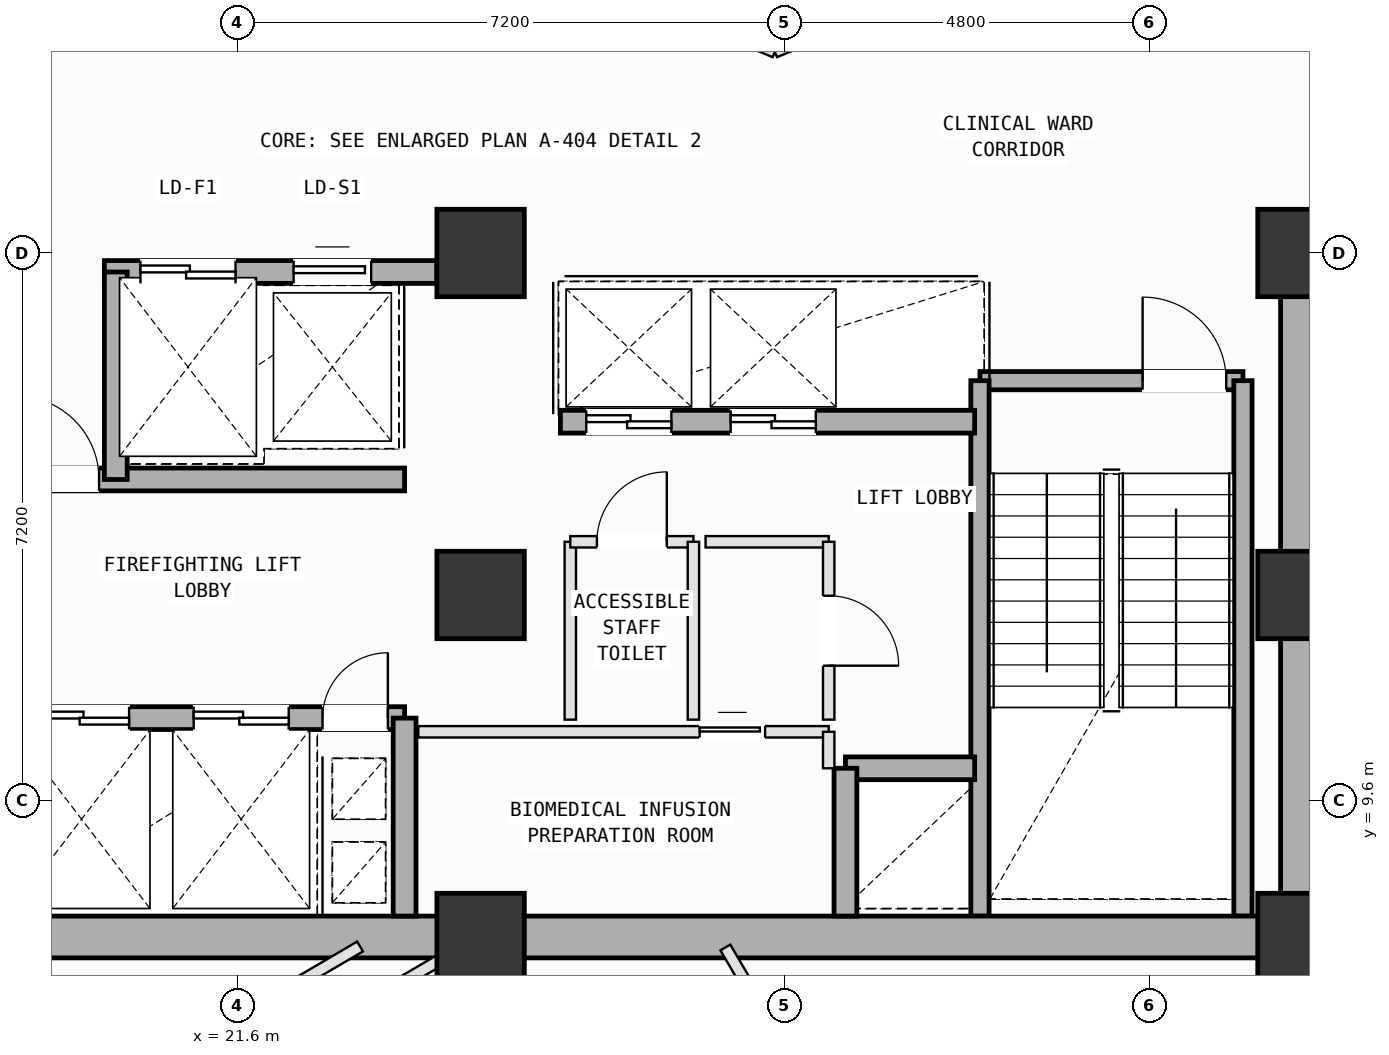
"""IFC4 building model, lengths in metres.
Left out: names, types, materials, properties, quantities, classifications, styles, units other than length and angle.
Written with IfcOpenShell. Run it as: python <this file> out.ifc"""

import sys

from ifc_helpers import new_model, si_unit, direction, frame, frame_2d, origin, origin_2d, place, context, subcontext, project, spatial, rectangle, extrude, element, fill, save


model = new_model("IFC4")
c1 = context("Model", 3, precision=1e-05, world=origin(), true_north=direction((0.0, 1.0)))
c2 = subcontext(c1, "Body", "Model", "MODEL_VIEW")
j1 = project(units=[si_unit("LENGTHUNIT", "METRE"), si_unit("PLANEANGLEUNIT", "RADIAN")], contexts=[c1])
p1 = place(None, origin())
s1 = spatial("IfcSite", under=j1, at=p1, CompositionType="ELEMENT")
p2 = place(p1, origin())
s2 = spatial("IfcBuilding", under=s1, at=p2, CompositionType="ELEMENT")
p3 = place(p2, frame((0.0, 0.0, 153.8)))
s3 = spatial("IfcBuildingStorey", under=s2, at=p3, CompositionType="ELEMENT", Elevation=153.8)
for number, where, z_axis, x_axis in (
    (1, (24.8, 7.8, 0.0), (0.0, 0.0, 1.0), (1.0, 0.0, 0.0)),
    (2, (24.8, 12.3, 0.0), (0.0, 0.0, 1.0), (1.0, 0.0, 0.0)),
    (3, (24.8, 16.8, 0.0), (0.0, 0.0, 1.0), (1.0, 0.0, 0.0)),
    (4, (35.6, 7.8, 0.0), (0.0, 0.0, 1.0), (1.0, 0.0, 0.0)),
    (5, (35.6, 12.3, 0.0), (0.0, 0.0, 1.0), (1.0, 0.0, 0.0)),
    (6, (35.6, 16.8, 0.0), (0.0, 0.0, 1.0), (1.0, 0.0, 0.0)),
):
    element("IfcColumn", number, at=place(p3, frame(where, z_axis=z_axis, x_axis=x_axis)), inside=s3, PredefinedType="COLUMN", context=c2, shape_type="SweptSolid", body=[
        extrude(rectangle(XDim=1.15, YDim=1.15, at=origin_2d()), origin(), (0.0, 0.0, 1.0), 4.0),
    ])
p4 = place(p3, frame((28.634, 20.321, 0.002), z_axis=(0.018686718776, -0.020396614612, 0.999617319105), x_axis=(-0.467601093999, 0.883534166025, 0.026769280116)))
e7 = element("IfcColumn", 7, at=p4, inside=s3, PredefinedType="COLUMN", context=c2, shape_type="SweptSolid", body=[
    extrude(rectangle(XDim=1.4, YDim=0.8, at=origin_2d()), origin(), (0.0, 0.0, 1.0), 3.998),
])
p5 = place(p3, frame((31.37, 15.12, 0.0), z_axis=(0.0, 0.0, 1.0), x_axis=(1.0, 0.0, 0.0)))
e8 = element("IfcWall", 8, at=p5, inside=s3, PredefinedType="SOLIDWALL", context=c2, shape_type="SweptSolid", body=[
    extrude(rectangle(XDim=3.46, YDim=0.24, at=frame_2d((1.73, 0.0))), origin(), (0.0, 0.0, 1.0), 3.78),
])
p6 = place(p5, frame((2.14, 0.0, 0.0)))
e9 = element("IfcOpeningElement", 9, at=p6, cuts=e8, PredefinedType="OPENING", context=c2, shape_type="SweptSolid", body=[
    extrude(rectangle(XDim=1.1, YDim=2.15, at=frame_2d((0.55, 1.075))), frame((0.0, 0.13, 0.0), z_axis=(0.0, -1.0, 0.0), x_axis=(1.0, 0.0, 0.0)), (0.0, 0.0, 1.0), 0.26),
])
for number, where, z_axis, x_axis in (
    (10, (34.83, 15.12, 0.0), (0.0, 0.0, 1.0), (0.0, -1.0, 0.0)),
    (11, (31.37, 8.075, 0.0), (0.0, 0.0, 1.0), (0.0, 1.0, 0.0)),
):
    element("IfcWall", number, at=place(p3, frame(where, z_axis=z_axis, x_axis=x_axis)), inside=s3, PredefinedType="SOLIDWALL", context=c2, shape_type="SweptSolid", body=[
        extrude(rectangle(XDim=7.045, YDim=0.24, at=frame_2d((3.522, 0.0))), origin(), (0.0, 0.0, 1.0), 3.78),
    ])
for number, where, z_axis, x_axis in (
    (12, (14.0, 7.8, 0.0), (0.0, 0.0, 1.0), (1.0, 0.0, 0.0)),
    (13, (24.8, 7.8, 0.0), (0.0, 0.0, 1.0), (1.0, 0.0, 0.0)),
):
    element("IfcWall", number, at=place(p3, frame(where, z_axis=z_axis, x_axis=x_axis)), inside=s3, PredefinedType="SHEAR", context=c2, shape_type="SweptSolid", body=[
        extrude(rectangle(XDim=10.8, YDim=0.55, at=frame_2d((5.4, 0.0))), origin(), (0.0, 0.0, 1.0), 3.78),
    ])
p7 = place(p3, frame((35.6, 7.8, 0.0), z_axis=(0.0, 0.0, 1.0), x_axis=(0.0, 1.0, 0.0)))
e14 = element("IfcWall", 14, at=p7, inside=s3, PredefinedType="SHEAR", context=c2, shape_type="SweptSolid", body=[
    extrude(rectangle(XDim=9.0, YDim=0.55, at=frame_2d((4.5, 0.0))), origin(), (0.0, 0.0, 1.0), 3.78),
])
p8 = place(p3, frame((19.85, 16.55, 0.0), z_axis=(0.0, 0.0, 1.0), x_axis=(1.0, 0.0, 0.0)))
e15 = element("IfcWall", 15, at=p8, inside=s3, PredefinedType="SOLIDWALL", context=c2, shape_type="SweptSolid", body=[
    extrude(rectangle(XDim=4.375, YDim=0.3, at=frame_2d((2.188, 0.0))), origin(), (0.0, 0.0, 1.0), 3.78),
])
p9 = place(p8, frame((0.475, 0.0, 0.0)))
e16 = element("IfcOpeningElement", 16, at=p9, cuts=e15, PredefinedType="OPENING", context=c2, shape_type="SweptSolid", body=[
    extrude(rectangle(XDim=1.25, YDim=2.18, at=frame_2d((0.625, 1.09))), frame((0.0, 0.16, 0.0), z_axis=(0.0, -1.0, 0.0), x_axis=(1.0, 0.0, 0.0)), (0.0, 0.0, 1.0), 0.32),
])
p10 = place(p8, frame((2.49, 0.0, 0.0)))
e17 = element("IfcOpeningElement", 17, at=p10, cuts=e15, PredefinedType="OPENING", context=c2, shape_type="SweptSolid", body=[
    extrude(rectangle(XDim=1.02, YDim=2.12, at=frame_2d((0.51, 1.06))), frame((0.0, 0.16, 0.0), z_axis=(0.0, -1.0, 0.0), x_axis=(1.0, 0.0, 0.0)), (0.0, 0.0, 1.0), 0.32),
])
p11 = place(p3, frame((18.5, 10.68, 0.0), z_axis=(0.0, 0.0, 1.0), x_axis=(1.0, 0.0, 0.0)))
e18 = element("IfcWall", 18, at=p11, inside=s3, PredefinedType="SOLIDWALL", context=c2, shape_type="SweptSolid", body=[
    extrude(rectangle(XDim=5.3, YDim=0.3, at=frame_2d((2.65, 0.0))), origin(), (0.0, 0.0, 1.0), 3.78),
])
p12 = place(p11, frame((4.22, 0.0, 0.0)))
e19 = element("IfcOpeningElement", 19, at=p12, cuts=e18, PredefinedType="OPENING", context=c2, shape_type="SweptSolid", body=[
    extrude(rectangle(XDim=0.86, YDim=2.06, at=frame_2d((0.43, 1.03))), frame((0.0, 0.16, 0.0), z_axis=(0.0, -1.0, 0.0), x_axis=(1.0, 0.0, 0.0)), (0.0, 0.0, 1.0), 0.32),
])
p13 = place(p11, frame((0.425, 0.0, 0.0)))
e20 = element("IfcOpeningElement", 20, at=p13, cuts=e18, PredefinedType="OPENING", context=c2, shape_type="SweptSolid", body=[
    extrude(rectangle(XDim=1.25, YDim=2.18, at=frame_2d((0.625, 1.09))), frame((0.0, 0.16, 0.0), z_axis=(0.0, -1.0, 0.0), x_axis=(1.0, 0.0, 0.0)), (0.0, 0.0, 1.0), 0.32),
])
p14 = place(p11, frame((2.525, 0.0, 0.0)))
e21 = element("IfcOpeningElement", 21, at=p14, cuts=e18, PredefinedType="OPENING", context=c2, shape_type="SweptSolid", body=[
    extrude(rectangle(XDim=1.25, YDim=2.18, at=frame_2d((0.625, 1.09))), frame((0.0, 0.16, 0.0), z_axis=(0.0, -1.0, 0.0), x_axis=(1.0, 0.0, 0.0)), (0.0, 0.0, 1.0), 0.32),
])
p15 = place(p3, frame((18.5, 13.82, 0.0), z_axis=(0.0, 0.0, 1.0), x_axis=(1.0, 0.0, 0.0)))
e22 = element("IfcWall", 22, at=p15, inside=s3, PredefinedType="SOLIDWALL", context=c2, shape_type="SweptSolid", body=[
    extrude(rectangle(XDim=5.3, YDim=0.3, at=frame_2d((2.65, 0.0))), origin(), (0.0, 0.0, 1.0), 3.78),
])
p16 = place(p15, frame((0.18, 0.0, 0.0)))
e23 = element("IfcOpeningElement", 23, at=p16, cuts=e22, PredefinedType="OPENING", context=c2, shape_type="SweptSolid", body=[
    extrude(rectangle(XDim=1.1, YDim=2.15, at=frame_2d((0.55, 1.075))), frame((0.0, 0.16, 0.0), z_axis=(0.0, -1.0, 0.0), x_axis=(1.0, 0.0, 0.0)), (0.0, 0.0, 1.0), 0.32),
])
p17 = place(p3, frame((23.8, 8.075, 0.0), z_axis=(0.0, 0.0, 1.0), x_axis=(0.0, 1.0, 0.0)))
e24 = element("IfcWall", 24, at=p17, inside=s3, PredefinedType="SOLIDWALL", context=c2, shape_type="SweptSolid", body=[
    extrude(rectangle(XDim=2.605, YDim=0.3, at=frame_2d((1.302, 0.0))), origin(), (0.0, 0.0, 1.0), 3.78),
])
p18 = place(p3, frame((20.0, 13.82, 0.0), z_axis=(0.0, 0.0, 1.0), x_axis=(0.0, 1.0, 0.0)))
e25 = element("IfcWall", 25, at=p18, inside=s3, PredefinedType="SOLIDWALL", context=c2, shape_type="SweptSolid", body=[
    extrude(rectangle(XDim=2.73, YDim=0.3, at=frame_2d((1.365, 0.0))), origin(), (0.0, 0.0, 1.0), 3.78),
])
p19 = place(p3, frame((29.6, 10.02, 0.0), z_axis=(0.0, 0.0, 1.0), x_axis=(1.0, 0.0, 0.0)))
e26 = element("IfcWall", 26, at=p19, inside=s3, PredefinedType="SOLIDWALL", context=c2, shape_type="SweptSolid", body=[
    extrude(rectangle(XDim=1.7, YDim=0.3, at=frame_2d((0.85, 0.0))), origin(), (0.0, 0.0, 1.0), 3.78),
])
p20 = place(p3, frame((29.6, 8.075, 0.0), z_axis=(0.0, 0.0, 1.0), x_axis=(0.0, 1.0, 0.0)))
e27 = element("IfcWall", 27, at=p20, inside=s3, PredefinedType="SOLIDWALL", context=c2, shape_type="SweptSolid", body=[
    extrude(rectangle(XDim=1.945, YDim=0.3, at=frame_2d((0.973, 0.0))), origin(), (0.0, 0.0, 1.0), 3.78),
])
p21 = place(p3, frame((25.85, 14.58, 0.0), z_axis=(0.0, 0.0, 1.0), x_axis=(1.0, 0.0, 0.0)))
e28 = element("IfcWall", 28, at=p21, inside=s3, PredefinedType="SOLIDWALL", context=c2, shape_type="SweptSolid", body=[
    extrude(rectangle(XDim=5.45, YDim=0.3, at=frame_2d((2.725, 0.0))), origin(), (0.0, 0.0, 1.0), 3.78),
])
p22 = place(p21, frame((0.34, 0.0, 0.0)))
e29 = element("IfcOpeningElement", 29, at=p22, cuts=e28, PredefinedType="OPENING", context=c2, shape_type="SweptSolid", body=[
    extrude(rectangle(XDim=1.12, YDim=2.15, at=frame_2d((0.56, 1.075))), frame((0.0, 0.16, 0.0), z_axis=(0.0, -1.0, 0.0), x_axis=(1.0, 0.0, 0.0)), (0.0, 0.0, 1.0), 0.32),
])
p23 = place(p21, frame((2.24, 0.0, 0.0)))
e30 = element("IfcOpeningElement", 30, at=p23, cuts=e28, PredefinedType="OPENING", context=c2, shape_type="SweptSolid", body=[
    extrude(rectangle(XDim=1.12, YDim=2.15, at=frame_2d((0.56, 1.075))), frame((0.0, 0.16, 0.0), z_axis=(0.0, -1.0, 0.0), x_axis=(1.0, 0.0, 0.0)), (0.0, 0.0, 1.0), 0.32),
])
p24 = place(p3, frame((23.98, 10.5, 0.0), z_axis=(0.0, 0.0, 1.0), x_axis=(1.0, 0.0, 0.0)))
e31 = element("IfcWall", 31, at=p24, inside=s3, PredefinedType="PARTITIONING", context=c2, shape_type="SweptSolid", body=[
    extrude(rectangle(XDim=5.4, YDim=0.15, at=frame_2d((2.7, 0.0))), origin(), (0.0, 0.0, 1.0), 3.78),
])
p25 = place(p24, frame((3.703, 0.0, 0.0)))
e32 = element("IfcOpeningElement", 32, at=p25, cuts=e31, PredefinedType="OPENING", context=c2, shape_type="SweptSolid", body=[
    extrude(rectangle(XDim=0.86, YDim=2.06, at=frame_2d((0.43, 1.03))), frame((0.0, 0.085, 0.0), z_axis=(0.0, -1.0, 0.0), x_axis=(1.0, 0.0, 0.0)), (0.0, 0.0, 1.0), 0.17),
])
p26 = place(p3, frame((29.38, 10.5, 0.0), z_axis=(0.0, 0.0, 1.0), x_axis=(0.0, -1.0, 0.0)))
e33 = element("IfcWall", 33, at=p26, inside=s3, PredefinedType="PARTITIONING", context=c2, shape_type="SweptSolid", body=[
    extrude(rectangle(XDim=0.48, YDim=0.15, at=frame_2d((0.24, 0.0))), origin(), (0.0, 0.0, 1.0), 3.78),
])
p27 = place(p3, frame((25.98, 10.66, 0.0), z_axis=(0.0, 0.0, 1.0), x_axis=(0.0, 1.0, 0.0)))
e34 = element("IfcWall", 34, at=p27, inside=s3, PredefinedType="PARTITIONING", context=c2, shape_type="SweptSolid", body=[
    extrude(rectangle(XDim=2.34, YDim=0.15, at=frame_2d((1.17, 0.0))), origin(), (0.0, 0.0, 1.0), 3.78),
])
p28 = place(p3, frame((25.98, 13.0, 0.0), z_axis=(0.0, 0.0, 1.0), x_axis=(1.0, 0.0, 0.0)))
e35 = element("IfcWall", 35, at=p28, inside=s3, PredefinedType="PARTITIONING", context=c2, shape_type="SweptSolid", body=[
    extrude(rectangle(XDim=1.62, YDim=0.15, at=frame_2d((0.81, 0.0))), origin(), (0.0, 0.0, 1.0), 3.78),
])
p29 = place(p28, frame((0.35, 0.0, 0.0)))
e36 = element("IfcOpeningElement", 36, at=p29, cuts=e35, PredefinedType="OPENING", context=c2, shape_type="SweptSolid", body=[
    extrude(rectangle(XDim=0.92, YDim=2.1, at=frame_2d((0.46, 1.05))), frame((0.0, 0.085, 0.0), z_axis=(0.0, -1.0, 0.0), x_axis=(1.0, 0.0, 0.0)), (0.0, 0.0, 1.0), 0.17),
])
p30 = place(p3, frame((27.6, 13.0, 0.0), z_axis=(0.0, 0.0, 1.0), x_axis=(0.0, -1.0, 0.0)))
e37 = element("IfcWall", 37, at=p30, inside=s3, PredefinedType="PARTITIONING", context=c2, shape_type="SweptSolid", body=[
    extrude(rectangle(XDim=2.34, YDim=0.15, at=frame_2d((1.17, 0.0))), origin(), (0.0, 0.0, 1.0), 3.78),
])
p31 = place(p3, frame((27.76, 13.0, 0.0), z_axis=(0.0, 0.0, 1.0), x_axis=(1.0, 0.0, 0.0)))
e38 = element("IfcWall", 38, at=p31, inside=s3, PredefinedType="PARTITIONING", context=c2, shape_type="SweptSolid", body=[
    extrude(rectangle(XDim=1.62, YDim=0.15, at=frame_2d((0.81, 0.0))), origin(), (0.0, 0.0, 1.0), 3.78),
])
p32 = place(p3, frame((29.38, 13.0, 0.0), z_axis=(0.0, 0.0, 1.0), x_axis=(0.0, -1.0, 0.0)))
e39 = element("IfcWall", 39, at=p32, inside=s3, PredefinedType="PARTITIONING", context=c2, shape_type="SweptSolid", body=[
    extrude(rectangle(XDim=2.34, YDim=0.15, at=frame_2d((1.17, 0.0))), origin(), (0.0, 0.0, 1.0), 3.78),
])
p33 = place(p32, frame((0.71, 0.0, 0.0)))
e40 = element("IfcOpeningElement", 40, at=p33, cuts=e39, PredefinedType="OPENING", context=c2, shape_type="SweptSolid", body=[
    extrude(rectangle(XDim=0.92, YDim=2.1, at=frame_2d((0.46, 1.05))), frame((0.0, 0.085, 0.0), z_axis=(0.0, -1.0, 0.0), x_axis=(1.0, 0.0, 0.0)), (0.0, 0.0, 1.0), 0.17),
])
p34 = place(p3, frame((22.438, 6.426, 0.0), z_axis=(0.0, 0.0, 1.0), x_axis=(0.862692781394, 0.505728350926, 0.0)))
e41 = element("IfcWall", 41, at=p34, inside=s3, PredefinedType="PARTITIONING", context=c2, shape_type="SweptSolid", body=[
    extrude(rectangle(XDim=2.124, YDim=0.15, at=frame_2d((1.062, 0.0))), origin(), (0.0, 0.0, 1.0), 3.78),
])
p35 = place(p3, frame((28.02, 7.662, 0.0), z_axis=(0.0, 0.0, 1.0), x_axis=(0.506063633063, -0.862496144508, 0.0)))
e42 = element("IfcWall", 42, at=p35, inside=s3, PredefinedType="PARTITIONING", context=c2, shape_type="SweptSolid", body=[
    extrude(rectangle(XDim=10.177, YDim=0.15, at=frame_2d((5.088, 0.0))), origin(), (0.0, 0.0, 1.0), 3.78),
])
p36 = place(p35, frame((4.832, 0.0, 0.0)))
e43 = element("IfcOpeningElement", 43, at=p36, cuts=e42, PredefinedType="OPENING", context=c2, shape_type="SweptSolid", body=[
    extrude(rectangle(XDim=0.86, YDim=2.06, at=frame_2d((0.43, 1.03))), frame((0.0, 0.085, 0.0), z_axis=(0.0, -1.0, 0.0), x_axis=(1.0, 0.0, 0.0)), (0.0, 0.0, 1.0), 0.17),
])
p37 = place(p3, frame((35.6, 7.5, 0.0), z_axis=(0.0, 0.0, 1.0), x_axis=(1.0, 0.0, 0.0)))
e44 = element("IfcWall", 44, at=p37, inside=s3, PredefinedType="PARTITIONING", context=c2, shape_type="SweptSolid", body=[
    extrude(rectangle(XDim=0.55, YDim=0.15, at=frame_2d((0.275, 0.0))), origin(), (0.0, 0.0, 1.0), 3.065),
])
p38 = place(p3, frame((23.214, 7.675, 0.0), z_axis=(0.0, 0.0, 1.0), x_axis=(-0.862480430276, -0.506090414245, 0.0)))
e45 = element("IfcWall", 45, at=p38, inside=s3, PredefinedType="PARTITIONING", context=c2, shape_type="SweptSolid", body=[
    extrude(rectangle(XDim=9.712, YDim=0.15, at=frame_2d((4.856, 0.0))), origin(), (0.0, 0.0, 1.0), 3.78),
])
p39 = place(p3, frame((29.261, 19.691, 0.0), z_axis=(0.0, 0.0, 1.0), x_axis=(-0.923629954024, -0.383285413275, 0.0)))
e46 = element("IfcWall", 46, at=p39, inside=s3, PredefinedType="PARTITIONING", context=c2, shape_type="SweptSolid", body=[
    extrude(rectangle(XDim=0.639, YDim=0.15, at=frame_2d((0.319, 0.0))), origin(), (0.0, 0.0, 1.0), 3.78),
])
p40 = place(p3, frame((28.671, 19.446, 0.0), z_axis=(0.0, 0.0, 1.0), x_axis=(-0.92334851348, 0.383962918333, 0.0)))
e47 = element("IfcWall", 47, at=p40, inside=s3, PredefinedType="PARTITIONING", context=c2, shape_type="SweptSolid", body=[
    extrude(rectangle(XDim=0.638, YDim=0.15, at=frame_2d((0.319, 0.0))), origin(), (0.0, 0.0, 1.0), 3.78),
])
p41 = place(p6, origin())
e48 = element("IfcDoor", 48, at=p41, inside=s3, OperationType="SINGLE_SWING_LEFT", PredefinedType="DOOR", context=c2, shape_type="SweptSolid", body=[
    extrude(rectangle(XDim=1.1, YDim=2.15, at=frame_2d((0.55, 1.075))), frame((0.0, 0.025, 0.0), z_axis=(0.0, -1.0, 0.0), x_axis=(1.0, 0.0, 0.0)), (0.0, 0.0, 1.0), 0.05),
])
fill(e9, e48)
p42 = place(p12, origin())
e49 = element("IfcDoor", 49, at=p42, inside=s3, OperationType="SINGLE_SWING_RIGHT", PredefinedType="DOOR", context=c2, shape_type="SweptSolid", body=[
    extrude(rectangle(XDim=0.86, YDim=2.06, at=frame_2d((0.43, 1.03))), frame((0.0, 0.025, 0.0), z_axis=(0.0, -1.0, 0.0), x_axis=(1.0, 0.0, 0.0)), (0.0, 0.0, 1.0), 0.05),
])
fill(e19, e49)
p43 = place(p16, origin())
e50 = element("IfcDoor", 50, at=p43, inside=s3, OperationType="SINGLE_SWING_LEFT", PredefinedType="DOOR", context=c2, shape_type="SweptSolid", body=[
    extrude(rectangle(XDim=1.1, YDim=2.15, at=frame_2d((0.55, 1.075))), frame((0.0, 0.025, 0.0), z_axis=(0.0, -1.0, 0.0), x_axis=(1.0, 0.0, 0.0)), (0.0, 0.0, 1.0), 0.05),
])
fill(e23, e50)
p44 = place(p13, origin())
e51 = element("IfcDoor", 51, at=p44, inside=s3, OperationType="DOUBLE_DOOR_SLIDING", PredefinedType="DOOR", context=c2, shape_type="SweptSolid", body=[
    extrude(rectangle(XDim=1.25, YDim=2.18, at=frame_2d((0.625, 1.09))), frame((0.0, 0.025, 0.0), z_axis=(0.0, -1.0, 0.0), x_axis=(1.0, 0.0, 0.0)), (0.0, 0.0, 1.0), 0.05),
])
fill(e20, e51)
p45 = place(p14, origin())
e52 = element("IfcDoor", 52, at=p45, inside=s3, OperationType="DOUBLE_DOOR_SLIDING", PredefinedType="DOOR", context=c2, shape_type="SweptSolid", body=[
    extrude(rectangle(XDim=1.25, YDim=2.18, at=frame_2d((0.625, 1.09))), frame((0.0, 0.025, 0.0), z_axis=(0.0, -1.0, 0.0), x_axis=(1.0, 0.0, 0.0)), (0.0, 0.0, 1.0), 0.05),
])
fill(e21, e52)
p46 = place(p22, origin())
e53 = element("IfcDoor", 53, at=p46, inside=s3, OperationType="DOUBLE_DOOR_SLIDING", PredefinedType="DOOR", context=c2, shape_type="SweptSolid", body=[
    extrude(rectangle(XDim=1.12, YDim=2.15, at=frame_2d((0.56, 1.075))), frame((0.0, 0.025, 0.0), z_axis=(0.0, -1.0, 0.0), x_axis=(1.0, 0.0, 0.0)), (0.0, 0.0, 1.0), 0.05),
])
fill(e29, e53)
p47 = place(p23, origin())
e54 = element("IfcDoor", 54, at=p47, inside=s3, OperationType="DOUBLE_DOOR_SLIDING", PredefinedType="DOOR", context=c2, shape_type="SweptSolid", body=[
    extrude(rectangle(XDim=1.12, YDim=2.15, at=frame_2d((0.56, 1.075))), frame((0.0, 0.025, 0.0), z_axis=(0.0, -1.0, 0.0), x_axis=(1.0, 0.0, 0.0)), (0.0, 0.0, 1.0), 0.05),
])
fill(e30, e54)
p48 = place(p9, origin())
e55 = element("IfcDoor", 55, at=p48, inside=s3, OperationType="DOUBLE_DOOR_SLIDING", PredefinedType="DOOR", context=c2, shape_type="SweptSolid", body=[
    extrude(rectangle(XDim=1.25, YDim=2.18, at=frame_2d((0.625, 1.09))), frame((0.0, 0.025, 0.0), z_axis=(0.0, -1.0, 0.0), x_axis=(1.0, 0.0, 0.0)), (0.0, 0.0, 1.0), 0.05),
])
fill(e16, e55)
p49 = place(p10, origin())
e56 = element("IfcDoor", 56, at=p49, inside=s3, OperationType="SLIDING_TO_LEFT", PredefinedType="DOOR", context=c2, shape_type="SweptSolid", body=[
    extrude(rectangle(XDim=1.02, YDim=2.12, at=frame_2d((0.51, 1.06))), frame((0.0, 0.025, 0.0), z_axis=(0.0, -1.0, 0.0), x_axis=(1.0, 0.0, 0.0)), (0.0, 0.0, 1.0), 0.05),
])
fill(e17, e56)
p50 = place(p29, origin())
e57 = element("IfcDoor", 57, at=p50, inside=s3, OperationType="SINGLE_SWING_RIGHT", PredefinedType="DOOR", context=c2, shape_type="SweptSolid", body=[
    extrude(rectangle(XDim=0.92, YDim=2.1, at=frame_2d((0.46, 1.05))), frame((0.0, 0.025, 0.0), z_axis=(0.0, -1.0, 0.0), x_axis=(1.0, 0.0, 0.0)), (0.0, 0.0, 1.0), 0.05),
])
fill(e36, e57)
p51 = place(p33, origin())
e58 = element("IfcDoor", 58, at=p51, inside=s3, OperationType="SINGLE_SWING_RIGHT", PredefinedType="DOOR", context=c2, shape_type="SweptSolid", body=[
    extrude(rectangle(XDim=0.92, YDim=2.1, at=frame_2d((0.46, 1.05))), frame((0.0, 0.025, 0.0), z_axis=(0.0, -1.0, 0.0), x_axis=(1.0, 0.0, 0.0)), (0.0, 0.0, 1.0), 0.05),
])
fill(e40, e58)
p52 = place(p25, origin())
e59 = element("IfcDoor", 59, at=p52, inside=s3, OperationType="SLIDING_TO_LEFT", PredefinedType="DOOR", context=c2, shape_type="SweptSolid", body=[
    extrude(rectangle(XDim=0.86, YDim=2.06, at=frame_2d((0.43, 1.03))), frame((0.0, 0.025, 0.0), z_axis=(0.0, -1.0, 0.0), x_axis=(1.0, 0.0, 0.0)), (0.0, 0.0, 1.0), 0.05),
])
fill(e32, e59)
save(model, sys.argv[1])
